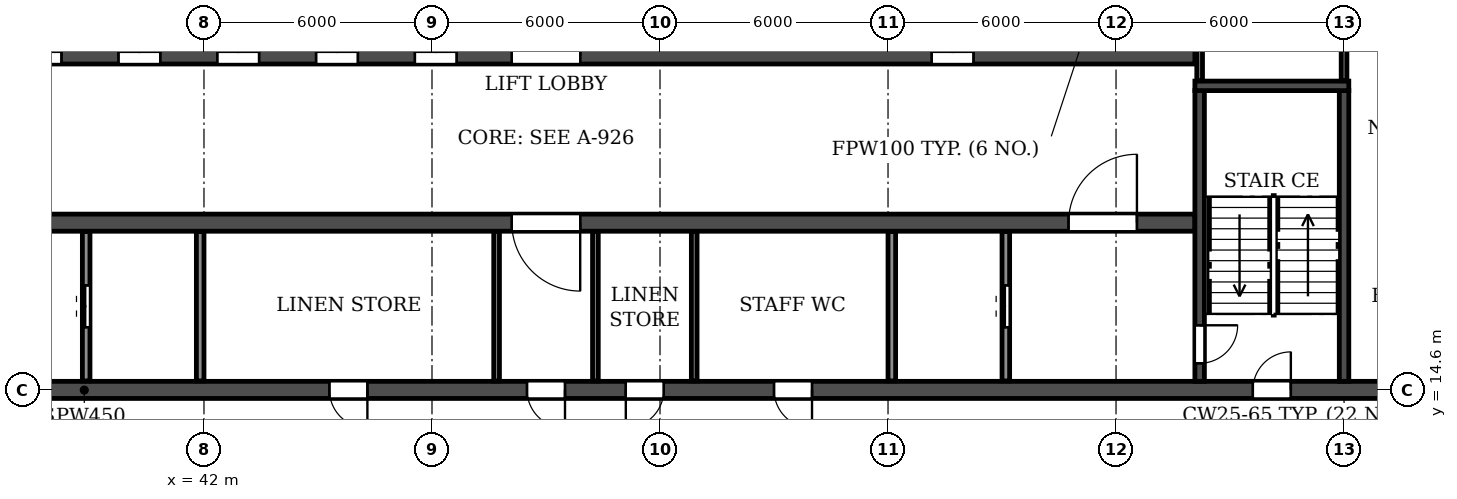
"""IFC4 building model, lengths in metres.
Left out: names, types, materials, properties, quantities, classifications, styles, units other than length and angle.
Written with IfcOpenShell. Run it as: python <this file> out.ifc"""

import sys

from ifc_helpers import new_model, si_unit, direction, frame, frame_2d, origin, place, context, subcontext, project, spatial, rectangle, extrude, element, fill, save


model = new_model("IFC4")
c1 = context("Model", 3, precision=1e-05, world=origin(), true_north=direction((0.0, 1.0)))
c2 = subcontext(c1, "Body", "Model", "MODEL_VIEW")
j1 = project(units=[si_unit("LENGTHUNIT", "METRE"), si_unit("PLANEANGLEUNIT", "RADIAN")], contexts=[c1])
p1 = place(None, origin())
s1 = spatial("IfcSite", under=j1, at=p1, CompositionType="ELEMENT")
p2 = place(p1, origin())
s2 = spatial("IfcBuilding", under=s1, at=p2, CompositionType="ELEMENT")
p3 = place(p2, frame((0.0, 0.0, 142.2)))
s3 = spatial("IfcBuildingStorey", under=s2, at=p3, CompositionType="ELEMENT", Elevation=142.2)
p4 = place(p3, frame((12.2, 14.6, 0.0), z_axis=(0.0, 0.0, 1.0), x_axis=(1.0, 0.0, 0.0)))
e1 = element("IfcWall", 1, at=p4, inside=s3, PredefinedType="SOLIDWALL", context=c2, shape_type="SweptSolid", body=[
    extrude(rectangle(XDim=77.6, YDim=0.45, at=frame_2d((38.8, 0.0))), origin(), (0.0, 0.0, 1.0), 3.07),
])
p5 = place(p4, frame((0.8, 0.0, 0.0)))
e2 = element("IfcOpeningElement", 2, at=p5, cuts=e1, PredefinedType="OPENING", context=c2, shape_type="SweptSolid", body=[
    extrude(rectangle(XDim=1.0, YDim=2.1, at=frame_2d((0.5, 1.05))), frame((0.0, 0.235, 0.0), z_axis=(0.0, -1.0, 0.0), x_axis=(1.0, 0.0, 0.0)), (0.0, 0.0, 1.0), 0.47),
])
p6 = place(p4, frame((3.8, 0.0, 0.0)))
e3 = element("IfcOpeningElement", 3, at=p6, cuts=e1, PredefinedType="OPENING", context=c2, shape_type="SweptSolid", body=[
    extrude(rectangle(XDim=1.0, YDim=2.1, at=frame_2d((0.5, 1.05))), frame((0.0, 0.235, 0.0), z_axis=(0.0, -1.0, 0.0), x_axis=(1.0, 0.0, 0.0)), (0.0, 0.0, 1.0), 0.47),
])
p7 = place(p4, frame((6.7, 0.0, 0.0)))
e4 = element("IfcOpeningElement", 4, at=p7, cuts=e1, PredefinedType="OPENING", context=c2, shape_type="SweptSolid", body=[
    extrude(rectangle(XDim=1.0, YDim=2.1, at=frame_2d((0.5, 1.05))), frame((0.0, 0.235, 0.0), z_axis=(0.0, -1.0, 0.0), x_axis=(1.0, 0.0, 0.0)), (0.0, 0.0, 1.0), 0.47),
])
p8 = place(p4, frame((14.6, 0.0, 0.0)))
e5 = element("IfcOpeningElement", 5, at=p8, cuts=e1, PredefinedType="OPENING", context=c2, shape_type="SweptSolid", body=[
    extrude(rectangle(XDim=1.0, YDim=2.1, at=frame_2d((0.5, 1.05))), frame((0.0, 0.235, 0.0), z_axis=(0.0, -1.0, 0.0), x_axis=(1.0, 0.0, 0.0)), (0.0, 0.0, 1.0), 0.47),
])
p9 = place(p4, frame((19.2, 0.0, 0.0)))
e6 = element("IfcOpeningElement", 6, at=p9, cuts=e1, PredefinedType="OPENING", context=c2, shape_type="SweptSolid", body=[
    extrude(rectangle(XDim=1.0, YDim=2.1, at=frame_2d((0.5, 1.05))), frame((0.0, 0.235, 0.0), z_axis=(0.0, -1.0, 0.0), x_axis=(1.0, 0.0, 0.0)), (0.0, 0.0, 1.0), 0.47),
])
p10 = place(p4, frame((33.1, 0.0, 0.0)))
e7 = element("IfcOpeningElement", 7, at=p10, cuts=e1, PredefinedType="OPENING", context=c2, shape_type="SweptSolid", body=[
    extrude(rectangle(XDim=1.0, YDim=2.1, at=frame_2d((0.5, 1.05))), frame((0.0, 0.235, 0.0), z_axis=(0.0, -1.0, 0.0), x_axis=(1.0, 0.0, 0.0)), (0.0, 0.0, 1.0), 0.47),
])
p11 = place(p4, frame((38.3, 0.0, 0.0)))
e8 = element("IfcOpeningElement", 8, at=p11, cuts=e1, PredefinedType="OPENING", context=c2, shape_type="SweptSolid", body=[
    extrude(rectangle(XDim=1.0, YDim=2.1, at=frame_2d((0.5, 1.05))), frame((0.0, 0.235, 0.0), z_axis=(0.0, -1.0, 0.0), x_axis=(1.0, 0.0, 0.0)), (0.0, 0.0, 1.0), 0.47),
])
p12 = place(p4, frame((40.9, 0.0, 0.0)))
e9 = element("IfcOpeningElement", 9, at=p12, cuts=e1, PredefinedType="OPENING", context=c2, shape_type="SweptSolid", body=[
    extrude(rectangle(XDim=1.0, YDim=2.1, at=frame_2d((0.5, 1.05))), frame((0.0, 0.235, 0.0), z_axis=(0.0, -1.0, 0.0), x_axis=(1.0, 0.0, 0.0)), (0.0, 0.0, 1.0), 0.47),
])
p13 = place(p4, frame((44.8, 0.0, 0.0)))
e10 = element("IfcOpeningElement", 10, at=p13, cuts=e1, PredefinedType="OPENING", context=c2, shape_type="SweptSolid", body=[
    extrude(rectangle(XDim=1.0, YDim=2.1, at=frame_2d((0.5, 1.05))), frame((0.0, 0.235, 0.0), z_axis=(0.0, -1.0, 0.0), x_axis=(1.0, 0.0, 0.0)), (0.0, 0.0, 1.0), 0.47),
])
p14 = place(p4, frame((57.4, 0.0, 0.0)))
e11 = element("IfcOpeningElement", 11, at=p14, cuts=e1, PredefinedType="OPENING", context=c2, shape_type="SweptSolid", body=[
    extrude(rectangle(XDim=1.0, YDim=2.1, at=frame_2d((0.5, 1.05))), frame((0.0, 0.235, 0.0), z_axis=(0.0, -1.0, 0.0), x_axis=(1.0, 0.0, 0.0)), (0.0, 0.0, 1.0), 0.47),
])
p15 = place(p4, frame((62.0, 0.0, 0.0)))
e12 = element("IfcOpeningElement", 12, at=p15, cuts=e1, PredefinedType="OPENING", context=c2, shape_type="SweptSolid", body=[
    extrude(rectangle(XDim=1.0, YDim=2.1, at=frame_2d((0.5, 1.05))), frame((0.0, 0.235, 0.0), z_axis=(0.0, -1.0, 0.0), x_axis=(1.0, 0.0, 0.0)), (0.0, 0.0, 1.0), 0.47),
])
p16 = place(p4, frame((69.9, 0.0, 0.0)))
e13 = element("IfcOpeningElement", 13, at=p16, cuts=e1, PredefinedType="OPENING", context=c2, shape_type="SweptSolid", body=[
    extrude(rectangle(XDim=1.0, YDim=2.1, at=frame_2d((0.5, 1.05))), frame((0.0, 0.235, 0.0), z_axis=(0.0, -1.0, 0.0), x_axis=(1.0, 0.0, 0.0)), (0.0, 0.0, 1.0), 0.47),
])
p17 = place(p4, frame((72.8, 0.0, 0.0)))
e14 = element("IfcOpeningElement", 14, at=p17, cuts=e1, PredefinedType="OPENING", context=c2, shape_type="SweptSolid", body=[
    extrude(rectangle(XDim=1.0, YDim=2.1, at=frame_2d((0.5, 1.05))), frame((0.0, 0.235, 0.0), z_axis=(0.0, -1.0, 0.0), x_axis=(1.0, 0.0, 0.0)), (0.0, 0.0, 1.0), 0.47),
])
p18 = place(p4, frame((75.8, 0.0, 0.0)))
e15 = element("IfcOpeningElement", 15, at=p18, cuts=e1, PredefinedType="OPENING", context=c2, shape_type="SweptSolid", body=[
    extrude(rectangle(XDim=1.0, YDim=2.1, at=frame_2d((0.5, 1.05))), frame((0.0, 0.235, 0.0), z_axis=(0.0, -1.0, 0.0), x_axis=(1.0, 0.0, 0.0)), (0.0, 0.0, 1.0), 0.47),
])
p19 = place(p3, frame((33.925, 19.0, 0.0), z_axis=(0.0, 0.0, 1.0), x_axis=(1.0, 0.0, 0.0)))
e16 = element("IfcWall", 16, at=p19, inside=s3, PredefinedType="SOLIDWALL", context=c2, shape_type="SweptSolid", body=[
    extrude(rectangle(XDim=34.15, YDim=0.45, at=frame_2d((17.075, 0.0))), origin(), (0.0, 0.0, 1.0), 3.07),
])
p20 = place(p19, frame((16.175, 0.0, 0.0)))
e17 = element("IfcOpeningElement", 17, at=p20, cuts=e16, PredefinedType="OPENING", context=c2, shape_type="SweptSolid", body=[
    extrude(rectangle(XDim=1.8, YDim=2.1, at=frame_2d((0.9, 1.05))), frame((0.0, 0.235, 0.0), z_axis=(0.0, -1.0, 0.0), x_axis=(1.0, 0.0, 0.0)), (0.0, 0.0, 1.0), 0.47),
])
p21 = place(p19, frame((1.525, 0.0, 0.0)))
e18 = element("IfcOpeningElement", 18, at=p21, cuts=e16, PredefinedType="OPENING", context=c2, shape_type="SweptSolid", body=[
    extrude(rectangle(XDim=1.8, YDim=2.1, at=frame_2d((0.9, 1.05))), frame((0.0, 0.235, 0.0), z_axis=(0.0, -1.0, 0.0), x_axis=(1.0, 0.0, 0.0)), (0.0, 0.0, 1.0), 0.47),
])
p22 = place(p19, frame((30.825, 0.0, 0.0)))
e19 = element("IfcOpeningElement", 19, at=p22, cuts=e16, PredefinedType="OPENING", context=c2, shape_type="SweptSolid", body=[
    extrude(rectangle(XDim=1.8, YDim=2.1, at=frame_2d((0.9, 1.05))), frame((0.0, 0.235, 0.0), z_axis=(0.0, -1.0, 0.0), x_axis=(1.0, 0.0, 0.0)), (0.0, 0.0, 1.0), 0.47),
])
p23 = place(p3, frame((33.925, 23.4, 0.0), z_axis=(0.0, 0.0, 1.0), x_axis=(1.0, 0.0, 0.0)))
e20 = element("IfcWall", 20, at=p23, inside=s3, PredefinedType="SOLIDWALL", context=c2, shape_type="SweptSolid", body=[
    extrude(rectangle(XDim=34.15, YDim=0.45, at=frame_2d((17.075, 0.0))), origin(), (0.0, 0.0, 1.0), 3.07),
])
p24 = place(p23, frame((16.175, 0.0, 0.0)))
e21 = element("IfcOpeningElement", 21, at=p24, cuts=e20, PredefinedType="OPENING", context=c2, shape_type="SweptSolid", body=[
    extrude(rectangle(XDim=1.8, YDim=2.1, at=frame_2d((0.9, 1.05))), frame((0.0, 0.235, 0.0), z_axis=(0.0, -1.0, 0.0), x_axis=(1.0, 0.0, 0.0)), (0.0, 0.0, 1.0), 0.47),
])
p25 = place(p23, frame((0.625, 0.0, 0.0)))
e22 = element("IfcOpeningElement", 22, at=p25, cuts=e20, PredefinedType="OPENING", context=c2, shape_type="SweptSolid", body=[
    extrude(rectangle(XDim=1.1, YDim=2.1, at=frame_2d((0.55, 1.05))), frame((0.0, 0.235, 0.0), z_axis=(0.0, -1.0, 0.0), x_axis=(1.0, 0.0, 0.0)), (0.0, 0.0, 1.0), 0.47),
])
p26 = place(p23, frame((3.225, 0.0, 0.0)))
e23 = element("IfcOpeningElement", 23, at=p26, cuts=e20, PredefinedType="OPENING", context=c2, shape_type="SweptSolid", body=[
    extrude(rectangle(XDim=1.1, YDim=2.1, at=frame_2d((0.55, 1.05))), frame((0.0, 0.235, 0.0), z_axis=(0.0, -1.0, 0.0), x_axis=(1.0, 0.0, 0.0)), (0.0, 0.0, 1.0), 0.47),
])
p27 = place(p23, frame((5.825, 0.0, 0.0)))
e24 = element("IfcOpeningElement", 24, at=p27, cuts=e20, PredefinedType="OPENING", context=c2, shape_type="SweptSolid", body=[
    extrude(rectangle(XDim=1.1, YDim=2.1, at=frame_2d((0.55, 1.05))), frame((0.0, 0.235, 0.0), z_axis=(0.0, -1.0, 0.0), x_axis=(1.0, 0.0, 0.0)), (0.0, 0.0, 1.0), 0.47),
])
p28 = place(p23, frame((8.425, 0.0, 0.0)))
e25 = element("IfcOpeningElement", 25, at=p28, cuts=e20, PredefinedType="OPENING", context=c2, shape_type="SweptSolid", body=[
    extrude(rectangle(XDim=1.1, YDim=2.1, at=frame_2d((0.55, 1.05))), frame((0.0, 0.235, 0.0), z_axis=(0.0, -1.0, 0.0), x_axis=(1.0, 0.0, 0.0)), (0.0, 0.0, 1.0), 0.47),
])
p29 = place(p23, frame((11.025, 0.0, 0.0)))
e26 = element("IfcOpeningElement", 26, at=p29, cuts=e20, PredefinedType="OPENING", context=c2, shape_type="SweptSolid", body=[
    extrude(rectangle(XDim=1.1, YDim=2.1, at=frame_2d((0.55, 1.05))), frame((0.0, 0.235, 0.0), z_axis=(0.0, -1.0, 0.0), x_axis=(1.0, 0.0, 0.0)), (0.0, 0.0, 1.0), 0.47),
])
p30 = place(p23, frame((13.625, 0.0, 0.0)))
e27 = element("IfcOpeningElement", 27, at=p30, cuts=e20, PredefinedType="OPENING", context=c2, shape_type="SweptSolid", body=[
    extrude(rectangle(XDim=1.1, YDim=2.1, at=frame_2d((0.55, 1.05))), frame((0.0, 0.235, 0.0), z_axis=(0.0, -1.0, 0.0), x_axis=(1.0, 0.0, 0.0)), (0.0, 0.0, 1.0), 0.47),
])
p31 = place(p23, frame((27.225, 0.0, 0.0)))
e28 = element("IfcOpeningElement", 28, at=p31, cuts=e20, PredefinedType="OPENING", context=c2, shape_type="SweptSolid", body=[
    extrude(rectangle(XDim=1.1, YDim=2.1, at=frame_2d((0.55, 1.05))), frame((0.0, 0.235, 0.0), z_axis=(0.0, -1.0, 0.0), x_axis=(1.0, 0.0, 0.0)), (0.0, 0.0, 1.0), 0.47),
])
p32 = place(p3, frame((68.2, 14.825, 0.0), z_axis=(0.0, 0.0, 1.0), x_axis=(0.0, 1.0, 0.0)))
e29 = element("IfcWall", 29, at=p32, inside=s3, PredefinedType="SOLIDWALL", context=c2, shape_type="SweptSolid", body=[
    extrude(rectangle(XDim=7.65, YDim=0.25, at=frame_2d((3.825, 0.0))), origin(), (0.0, 0.0, 1.0), 3.07),
])
p33 = place(p32, frame((0.475, 0.0, 0.0)))
e30 = element("IfcOpeningElement", 30, at=p33, cuts=e29, PredefinedType="OPENING", context=c2, shape_type="SweptSolid", body=[
    extrude(rectangle(XDim=1.0, YDim=2.1, at=frame_2d((0.5, 1.05))), frame((0.0, 0.135, 0.0), z_axis=(0.0, -1.0, 0.0), x_axis=(1.0, 0.0, 0.0)), (0.0, 0.0, 1.0), 0.27),
])
p34 = place(p3, frame((72.0, 14.825, 0.0), z_axis=(0.0, 0.0, 1.0), x_axis=(0.0, 1.0, 0.0)))
e31 = element("IfcWall", 31, at=p34, inside=s3, PredefinedType="SOLIDWALL", context=c2, shape_type="SweptSolid", body=[
    extrude(rectangle(XDim=7.65, YDim=0.25, at=frame_2d((3.825, 0.0))), origin(), (0.0, 0.0, 1.0), 3.07),
])
p35 = place(p3, frame((68.075, 22.6, 0.0), z_axis=(0.0, 0.0, 1.0), x_axis=(1.0, 0.0, 0.0)))
e32 = element("IfcWall", 32, at=p35, inside=s3, PredefinedType="SOLIDWALL", context=c2, shape_type="SweptSolid", body=[
    extrude(rectangle(XDim=4.05, YDim=0.25, at=frame_2d((2.025, 0.0))), origin(), (0.0, 0.0, 1.0), 3.07),
])
for number, where, z_axis, x_axis in (
    (33, (49.7, 14.835, 0.0), (0.0, 0.0, 1.0), (0.0, 1.0, 0.0)),
    (34, (52.3, 14.835, 0.0), (0.0, 0.0, 1.0), (0.0, 1.0, 0.0)),
    (35, (54.9, 14.835, 0.0), (0.0, 0.0, 1.0), (0.0, 1.0, 0.0)),
):
    element("IfcWall", number, at=place(p3, frame(where, z_axis=z_axis, x_axis=x_axis)), inside=s3, PredefinedType="PARTITIONING", context=c2, shape_type="SweptSolid", body=[
        extrude(rectangle(XDim=3.93, YDim=0.15, at=frame_2d((1.965, 0.0))), origin(), (0.0, 0.0, 1.0), 3.07),
    ])
for number, where, z_axis, x_axis in (
    (36, (68.2, 22.735, 0.0), (0.0, 0.0, 1.0), (0.0, 1.0, 0.0)),
    (37, (72.0, 22.735, 0.0), (0.0, 0.0, 1.0), (0.0, 1.0, 0.0)),
):
    element("IfcWall", number, at=place(p3, frame(where, z_axis=z_axis, x_axis=x_axis)), inside=s3, PredefinedType="PARTITIONING", context=c2, shape_type="SweptSolid", body=[
        extrude(rectangle(XDim=4.83, YDim=0.15, at=frame_2d((2.415, 0.0))), origin(), (0.0, 0.0, 1.0), 3.07),
    ])
p36 = place(p3, frame((38.9, 14.835, 0.0), z_axis=(0.0, 0.0, 1.0), x_axis=(0.0, 1.0, 0.0)))
e38 = element("IfcWall", 38, at=p36, inside=s3, PredefinedType="PARTITIONING", context=c2, shape_type="SweptSolid", body=[
    extrude(rectangle(XDim=3.93, YDim=0.2, at=frame_2d((1.965, 0.0))), origin(), (0.0, 0.0, 1.0), 3.07),
])
p37 = place(p36, frame((1.415, 0.0, 0.0)))
e39 = element("IfcOpeningElement", 39, at=p37, cuts=e38, PredefinedType="OPENING", context=c2, shape_type="SweptSolid", body=[
    extrude(rectangle(XDim=1.1, YDim=2.1, at=frame_2d((0.55, 1.05))), frame((0.0, 0.11, 0.0), z_axis=(0.0, -1.0, 0.0), x_axis=(1.0, 0.0, 0.0)), (0.0, 0.0, 1.0), 0.22),
])
for number, where, z_axis, x_axis in (
    (40, (41.9, 14.835, 0.0), (0.0, 0.0, 1.0), (0.0, 1.0, 0.0)),
    (41, (60.1, 14.835, 0.0), (0.0, 0.0, 1.0), (0.0, 1.0, 0.0)),
):
    element("IfcWall", number, at=place(p3, frame(where, z_axis=z_axis, x_axis=x_axis)), inside=s3, PredefinedType="PARTITIONING", context=c2, shape_type="SweptSolid", body=[
        extrude(rectangle(XDim=3.93, YDim=0.2, at=frame_2d((1.965, 0.0))), origin(), (0.0, 0.0, 1.0), 3.07),
    ])
p38 = place(p3, frame((63.1, 14.835, 0.0), z_axis=(0.0, 0.0, 1.0), x_axis=(0.0, 1.0, 0.0)))
e42 = element("IfcWall", 42, at=p38, inside=s3, PredefinedType="PARTITIONING", context=c2, shape_type="SweptSolid", body=[
    extrude(rectangle(XDim=3.93, YDim=0.2, at=frame_2d((1.965, 0.0))), origin(), (0.0, 0.0, 1.0), 3.07),
])
p39 = place(p38, frame((1.415, 0.0, 0.0)))
e43 = element("IfcOpeningElement", 43, at=p39, cuts=e42, PredefinedType="OPENING", context=c2, shape_type="SweptSolid", body=[
    extrude(rectangle(XDim=1.1, YDim=2.1, at=frame_2d((0.55, 1.05))), frame((0.0, 0.11, 0.0), z_axis=(0.0, -1.0, 0.0), x_axis=(1.0, 0.0, 0.0)), (0.0, 0.0, 1.0), 0.22),
])
p40 = place(p10, frame((1.0, 0.0, 0.0), z_axis=(0.0, 0.0, 1.0), x_axis=(-1.0, 0.0, 0.0)))
e44 = element("IfcDoor", 44, at=p40, inside=s3, OperationType="SINGLE_SWING_LEFT", PredefinedType="DOOR", context=c2, shape_type="SweptSolid", body=[
    extrude(rectangle(XDim=1.0, YDim=2.1, at=frame_2d((0.5, 1.05))), frame((0.0, 0.025, 0.0), z_axis=(0.0, -1.0, 0.0), x_axis=(1.0, 0.0, 0.0)), (0.0, 0.0, 1.0), 0.05),
])
fill(e7, e44)
p41 = place(p11, frame((1.0, 0.0, 0.0), z_axis=(0.0, 0.0, 1.0), x_axis=(-1.0, 0.0, 0.0)))
e45 = element("IfcDoor", 45, at=p41, inside=s3, OperationType="SINGLE_SWING_LEFT", PredefinedType="DOOR", context=c2, shape_type="SweptSolid", body=[
    extrude(rectangle(XDim=1.0, YDim=2.1, at=frame_2d((0.5, 1.05))), frame((0.0, 0.025, 0.0), z_axis=(0.0, -1.0, 0.0), x_axis=(1.0, 0.0, 0.0)), (0.0, 0.0, 1.0), 0.05),
])
fill(e8, e45)
p42 = place(p12, frame((1.0, 0.0, 0.0), z_axis=(0.0, 0.0, 1.0), x_axis=(-1.0, 0.0, 0.0)))
e46 = element("IfcDoor", 46, at=p42, inside=s3, OperationType="SINGLE_SWING_RIGHT", PredefinedType="DOOR", context=c2, shape_type="SweptSolid", body=[
    extrude(rectangle(XDim=1.0, YDim=2.1, at=frame_2d((0.5, 1.05))), frame((0.0, 0.025, 0.0), z_axis=(0.0, -1.0, 0.0), x_axis=(1.0, 0.0, 0.0)), (0.0, 0.0, 1.0), 0.05),
])
fill(e9, e46)
p43 = place(p13, frame((1.0, 0.0, 0.0), z_axis=(0.0, 0.0, 1.0), x_axis=(-1.0, 0.0, 0.0)))
e47 = element("IfcDoor", 47, at=p43, inside=s3, OperationType="SINGLE_SWING_LEFT", PredefinedType="DOOR", context=c2, shape_type="SweptSolid", body=[
    extrude(rectangle(XDim=1.0, YDim=2.1, at=frame_2d((0.5, 1.05))), frame((0.0, 0.025, 0.0), z_axis=(0.0, -1.0, 0.0), x_axis=(1.0, 0.0, 0.0)), (0.0, 0.0, 1.0), 0.05),
])
fill(e10, e47)
p44 = place(p14, origin())
e48 = element("IfcDoor", 48, at=p44, inside=s3, OperationType="SINGLE_SWING_RIGHT", PredefinedType="DOOR", context=c2, shape_type="SweptSolid", body=[
    extrude(rectangle(XDim=1.0, YDim=2.1, at=frame_2d((0.5, 1.05))), frame((0.0, 0.025, 0.0), z_axis=(0.0, -1.0, 0.0), x_axis=(1.0, 0.0, 0.0)), (0.0, 0.0, 1.0), 0.05),
])
fill(e11, e48)
p45 = place(p39, origin())
e49 = element("IfcDoor", 49, at=p45, inside=s3, OperationType="DOUBLE_DOOR_SLIDING", PredefinedType="DOOR", context=c2, shape_type="SweptSolid", body=[
    extrude(rectangle(XDim=1.1, YDim=2.1, at=frame_2d((0.55, 1.05))), frame((0.0, 0.025, 0.0), z_axis=(0.0, -1.0, 0.0), x_axis=(1.0, 0.0, 0.0)), (0.0, 0.0, 1.0), 0.05),
])
fill(e43, e49)
p46 = place(p33, frame((1.0, 0.0, 0.0), z_axis=(0.0, 0.0, 1.0), x_axis=(-1.0, 0.0, 0.0)))
e50 = element("IfcDoor", 50, at=p46, inside=s3, OperationType="SINGLE_SWING_LEFT", PredefinedType="DOOR", context=c2, shape_type="SweptSolid", body=[
    extrude(rectangle(XDim=1.0, YDim=2.1, at=frame_2d((0.5, 1.05))), frame((0.0, 0.025, 0.0), z_axis=(0.0, -1.0, 0.0), x_axis=(1.0, 0.0, 0.0)), (0.0, 0.0, 1.0), 0.05),
])
fill(e30, e50)
p47 = place(p37, origin())
e51 = element("IfcDoor", 51, at=p47, inside=s3, OperationType="DOUBLE_DOOR_SLIDING", PredefinedType="DOOR", context=c2, shape_type="SweptSolid", body=[
    extrude(rectangle(XDim=1.1, YDim=2.1, at=frame_2d((0.55, 1.05))), frame((0.0, 0.025, 0.0), z_axis=(0.0, -1.0, 0.0), x_axis=(1.0, 0.0, 0.0)), (0.0, 0.0, 1.0), 0.05),
])
fill(e39, e51)
p48 = place(p24, origin())
e52 = element("IfcDoor", 52, at=p48, inside=s3, OperationType="DOUBLE_DOOR_SINGLE_SWING", PredefinedType="DOOR", context=c2, shape_type="SweptSolid", body=[
    extrude(rectangle(XDim=1.8, YDim=2.1, at=frame_2d((0.9, 1.05))), frame((0.0, 0.025, 0.0), z_axis=(0.0, -1.0, 0.0), x_axis=(1.0, 0.0, 0.0)), (0.0, 0.0, 1.0), 0.05),
])
fill(e21, e52)
p49 = place(p20, frame((1.8, 0.0, 0.0), z_axis=(0.0, 0.0, 1.0), x_axis=(-1.0, 0.0, 0.0)))
e53 = element("IfcDoor", 53, at=p49, inside=s3, OperationType="DOUBLE_DOOR_SINGLE_SWING", PredefinedType="DOOR", context=c2, shape_type="SweptSolid", body=[
    extrude(rectangle(XDim=1.8, YDim=2.1, at=frame_2d((0.9, 1.05))), frame((0.0, 0.025, 0.0), z_axis=(0.0, -1.0, 0.0), x_axis=(1.0, 0.0, 0.0)), (0.0, 0.0, 1.0), 0.05),
])
fill(e17, e53)
p50 = place(p26, origin())
e54 = element("IfcDoor", 54, at=p50, inside=s3, OperationType="DOUBLE_DOOR_SLIDING", PredefinedType="DOOR", context=c2, shape_type="SweptSolid", body=[
    extrude(rectangle(XDim=1.1, YDim=2.1, at=frame_2d((0.55, 1.05))), frame((0.0, 0.025, 0.0), z_axis=(0.0, -1.0, 0.0), x_axis=(1.0, 0.0, 0.0)), (0.0, 0.0, 1.0), 0.05),
])
fill(e23, e54)
p51 = place(p27, origin())
e55 = element("IfcDoor", 55, at=p51, inside=s3, OperationType="DOUBLE_DOOR_SLIDING", PredefinedType="DOOR", context=c2, shape_type="SweptSolid", body=[
    extrude(rectangle(XDim=1.1, YDim=2.1, at=frame_2d((0.55, 1.05))), frame((0.0, 0.025, 0.0), z_axis=(0.0, -1.0, 0.0), x_axis=(1.0, 0.0, 0.0)), (0.0, 0.0, 1.0), 0.05),
])
fill(e24, e55)
p52 = place(p28, origin())
e56 = element("IfcDoor", 56, at=p52, inside=s3, OperationType="DOUBLE_DOOR_SLIDING", PredefinedType="DOOR", context=c2, shape_type="SweptSolid", body=[
    extrude(rectangle(XDim=1.1, YDim=2.1, at=frame_2d((0.55, 1.05))), frame((0.0, 0.025, 0.0), z_axis=(0.0, -1.0, 0.0), x_axis=(1.0, 0.0, 0.0)), (0.0, 0.0, 1.0), 0.05),
])
fill(e25, e56)
p53 = place(p29, origin())
e57 = element("IfcDoor", 57, at=p53, inside=s3, OperationType="DOUBLE_DOOR_SLIDING", PredefinedType="DOOR", context=c2, shape_type="SweptSolid", body=[
    extrude(rectangle(XDim=1.1, YDim=2.1, at=frame_2d((0.55, 1.05))), frame((0.0, 0.025, 0.0), z_axis=(0.0, -1.0, 0.0), x_axis=(1.0, 0.0, 0.0)), (0.0, 0.0, 1.0), 0.05),
])
fill(e26, e57)
p54 = place(p30, origin())
e58 = element("IfcDoor", 58, at=p54, inside=s3, OperationType="DOUBLE_DOOR_SLIDING", PredefinedType="DOOR", context=c2, shape_type="SweptSolid", body=[
    extrude(rectangle(XDim=1.1, YDim=2.1, at=frame_2d((0.55, 1.05))), frame((0.0, 0.025, 0.0), z_axis=(0.0, -1.0, 0.0), x_axis=(1.0, 0.0, 0.0)), (0.0, 0.0, 1.0), 0.05),
])
fill(e27, e58)
p55 = place(p31, origin())
e59 = element("IfcDoor", 59, at=p55, inside=s3, OperationType="DOUBLE_DOOR_SLIDING", PredefinedType="DOOR", context=c2, shape_type="SweptSolid", body=[
    extrude(rectangle(XDim=1.1, YDim=2.1, at=frame_2d((0.55, 1.05))), frame((0.0, 0.025, 0.0), z_axis=(0.0, -1.0, 0.0), x_axis=(1.0, 0.0, 0.0)), (0.0, 0.0, 1.0), 0.05),
])
fill(e28, e59)
p56 = place(p22, origin())
e60 = element("IfcDoor", 60, at=p56, inside=s3, OperationType="DOUBLE_DOOR_SINGLE_SWING", PredefinedType="DOOR", context=c2, shape_type="SweptSolid", body=[
    extrude(rectangle(XDim=1.8, YDim=2.1, at=frame_2d((0.9, 1.05))), frame((0.0, 0.025, 0.0), z_axis=(0.0, -1.0, 0.0), x_axis=(1.0, 0.0, 0.0)), (0.0, 0.0, 1.0), 0.05),
])
fill(e19, e60)
save(model, sys.argv[1])
